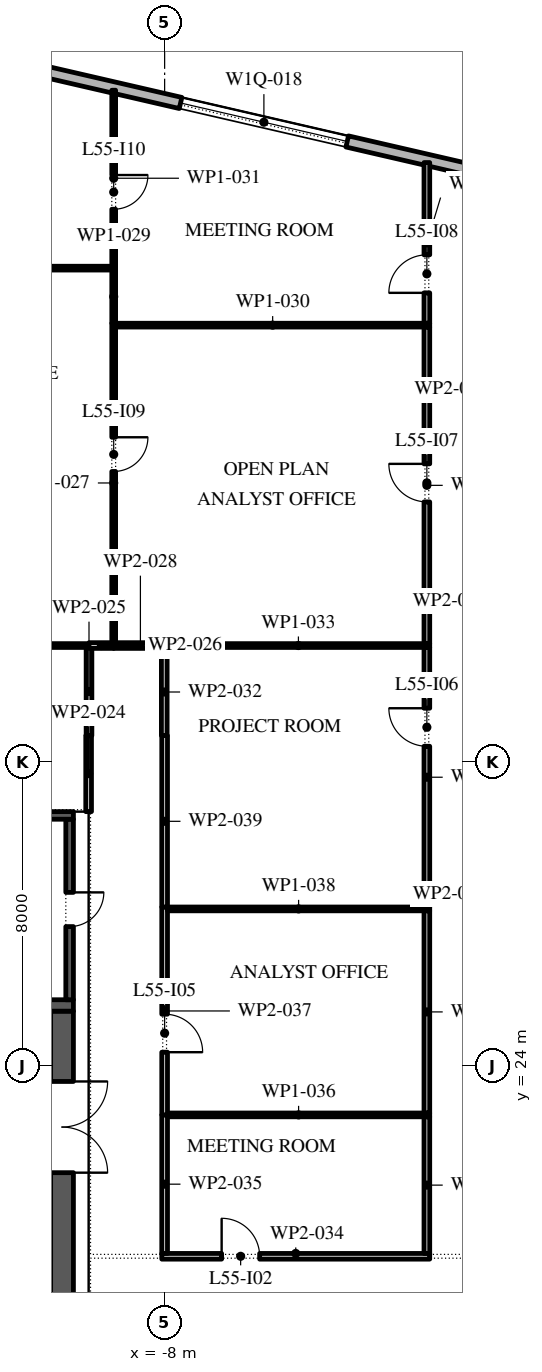
"""IFC4 building model, lengths in metres.
Left out: names, types, materials, properties, quantities, classifications, styles, units other than length and angle.
Written with IfcOpenShell. Run it as: python <this file> out.ifc"""

import sys

from ifc_helpers import new_model, si_unit, direction, frame, frame_2d, origin, place, context, subcontext, project, spatial, rectangle, extrude, element, fill, save


model = new_model("IFC4")
c1 = context("Model", 3, precision=1e-05, world=origin(), true_north=direction((0.0, 1.0)))
c2 = subcontext(c1, "Body", "Model", "MODEL_VIEW")
j1 = project(units=[si_unit("LENGTHUNIT", "METRE"), si_unit("PLANEANGLEUNIT", "RADIAN")], contexts=[c1])
p1 = place(None, origin())
s1 = spatial("IfcSite", under=j1, at=p1, CompositionType="ELEMENT")
p2 = place(p1, origin())
s2 = spatial("IfcBuilding", under=s1, at=p2, CompositionType="ELEMENT")
p3 = place(p2, frame((0.0, 0.0, 255.6)))
s3 = spatial("IfcBuildingStorey", under=s2, at=p3, CompositionType="ELEMENT", Elevation=255.6)
p4 = place(p3, frame((29.616, 40.758, 0.0), z_axis=(0.0, 0.0, 1.0), x_axis=(-0.974370532314, 0.224949029246, 0.0)))
e1 = element("IfcWall", 1, at=p4, inside=s3, PredefinedType="STANDARD", context=c2, shape_type="SweptSolid", body=[
    extrude(rectangle(XDim=48.0, YDim=0.3, at=frame_2d((24.0, 0.0))), origin(), (0.0, 0.0, 1.0), 4.0),
])
p5 = place(p4, frame((1.625, 0.0, 0.45)))
e2 = element("IfcOpeningElement", 2, at=p5, cuts=e1, PredefinedType="OPENING", context=c2, shape_type="SweptSolid", body=[
    extrude(rectangle(XDim=4.5, YDim=2.675, at=frame_2d((2.25, 1.337))), frame((0.0, 0.16, 0.0), z_axis=(0.0, -1.0, 0.0), x_axis=(1.0, 0.0, 0.0)), (0.0, 0.0, 1.0), 0.32),
])
p6 = place(p4, frame((10.575, 0.0, 0.0)))
e3 = element("IfcOpeningElement", 3, at=p6, cuts=e1, PredefinedType="OPENING", context=c2, shape_type="SweptSolid", body=[
    extrude(rectangle(XDim=2.4, YDim=3.5, at=frame_2d((1.2, 1.75))), frame((0.0, 0.16, 0.0), z_axis=(0.0, -1.0, 0.0), x_axis=(1.0, 0.0, 0.0)), (0.0, 0.0, 1.0), 0.32),
])
p7 = place(p4, frame((17.575, 0.0, 0.45)))
e4 = element("IfcOpeningElement", 4, at=p7, cuts=e1, PredefinedType="OPENING", context=c2, shape_type="SweptSolid", body=[
    extrude(rectangle(XDim=4.5, YDim=2.525, at=frame_2d((2.25, 1.262))), frame((0.0, 0.16, 0.0), z_axis=(0.0, -1.0, 0.0), x_axis=(1.0, 0.0, 0.0)), (0.0, 0.0, 1.0), 0.32),
])
p8 = place(p4, frame((25.625, 0.0, 0.45)))
e5 = element("IfcOpeningElement", 5, at=p8, cuts=e1, PredefinedType="OPENING", context=c2, shape_type="SweptSolid", body=[
    extrude(rectangle(XDim=4.5, YDim=2.45, at=frame_2d((2.25, 1.225))), frame((0.0, 0.16, 0.0), z_axis=(0.0, -1.0, 0.0), x_axis=(1.0, 0.0, 0.0)), (0.0, 0.0, 1.0), 0.32),
])
p9 = place(p4, frame((33.675, 0.0, 0.45)))
e6 = element("IfcOpeningElement", 6, at=p9, cuts=e1, PredefinedType="OPENING", context=c2, shape_type="SweptSolid", body=[
    extrude(rectangle(XDim=4.5, YDim=2.45, at=frame_2d((2.25, 1.225))), frame((0.0, 0.16, 0.0), z_axis=(0.0, -1.0, 0.0), x_axis=(1.0, 0.0, 0.0)), (0.0, 0.0, 1.0), 0.32),
])
p10 = place(p4, frame((42.775, 0.0, 0.0)))
e7 = element("IfcOpeningElement", 7, at=p10, cuts=e1, PredefinedType="OPENING", context=c2, shape_type="SweptSolid", body=[
    extrude(rectangle(XDim=2.4, YDim=3.5, at=frame_2d((1.2, 1.75))), frame((0.0, 0.16, 0.0), z_axis=(0.0, -1.0, 0.0), x_axis=(1.0, 0.0, 0.0)), (0.0, 0.0, 1.0), 0.32),
])
p11 = place(p3, frame((-10.7, -2.45, 0.0), z_axis=(0.0, 0.0, 1.0), x_axis=(0.0, 1.0, 0.0)))
e8 = element("IfcWall", 8, at=p11, inside=s3, PredefinedType="SHEAR", context=c2, shape_type="SweptSolid", body=[
    extrude(rectangle(XDim=27.9, YDim=0.6, at=frame_2d((13.95, 0.0))), origin(), (0.0, 0.0, 1.0), 4.0),
])
p12 = place(p11, frame((23.65, 0.0, 0.0)))
e9 = element("IfcOpeningElement", 9, at=p12, cuts=e8, PredefinedType="OPENING", context=c2, shape_type="SweptSolid", body=[
    extrude(rectangle(XDim=2.4, YDim=2.1, at=frame_2d((1.2, 1.05))), frame((0.0, 0.31, 0.0), z_axis=(0.0, -1.0, 0.0), x_axis=(1.0, 0.0, 0.0)), (0.0, 0.0, 1.0), 0.62),
])
p13 = place(p11, frame((1.087, 0.0, 0.0)))
e10 = element("IfcOpeningElement", 10, at=p13, cuts=e8, PredefinedType="OPENING", context=c2, shape_type="SweptSolid", body=[
    extrude(rectangle(XDim=0.9, YDim=2.1, at=frame_2d((0.45, 1.05))), frame((0.0, 0.31, 0.0), z_axis=(0.0, -1.0, 0.0), x_axis=(1.0, 0.0, 0.0)), (0.0, 0.0, 1.0), 0.62),
])
p14 = place(p11, frame((4.262, 0.0, 0.0)))
e11 = element("IfcOpeningElement", 11, at=p14, cuts=e8, PredefinedType="OPENING", context=c2, shape_type="SweptSolid", body=[
    extrude(rectangle(XDim=1.0, YDim=2.1, at=frame_2d((0.5, 1.05))), frame((0.0, 0.31, 0.0), z_axis=(0.0, -1.0, 0.0), x_axis=(1.0, 0.0, 0.0)), (0.0, 0.0, 1.0), 0.62),
])
p15 = place(p3, frame((-21.6, 25.6, 0.0), z_axis=(0.0, 0.0, 1.0), x_axis=(1.0, 0.0, 0.0)))
e12 = element("IfcWall", 12, at=p15, inside=s3, PredefinedType="SHEAR", context=c2, shape_type="SweptSolid", body=[
    extrude(rectangle(XDim=11.2, YDim=0.3, at=frame_2d((5.6, 0.0))), origin(), (0.0, 0.0, 1.0), 4.0),
])
p16 = place(p3, frame((-10.5, 25.75, 0.0), z_axis=(0.0, 0.0, 1.0), x_axis=(0.0, 1.0, 0.0)))
e13 = element("IfcWall", 13, at=p16, inside=s3, PredefinedType="SHEAR", context=c2, shape_type="SweptSolid", body=[
    extrude(rectangle(XDim=4.75, YDim=0.2, at=frame_2d((2.375, 0.0))), origin(), (0.0, 0.0, 1.0), 4.0),
])
p17 = place(p16, frame((1.925, 0.0, 0.0)))
e14 = element("IfcOpeningElement", 14, at=p17, cuts=e13, PredefinedType="OPENING", context=c2, shape_type="SweptSolid", body=[
    extrude(rectangle(XDim=0.9, YDim=2.1, at=frame_2d((0.45, 1.05))), frame((0.0, 0.11, 0.0), z_axis=(0.0, -1.0, 0.0), x_axis=(1.0, 0.0, 0.0)), (0.0, 0.0, 1.0), 0.22),
])
p18 = place(p3, frame((-21.6, 30.6, 0.0), z_axis=(0.0, 0.0, 1.0), x_axis=(1.0, 0.0, 0.0)))
e15 = element("IfcWall", 15, at=p18, inside=s3, PredefinedType="SHEAR", context=c2, shape_type="SweptSolid", body=[
    extrude(rectangle(XDim=11.2, YDim=0.2, at=frame_2d((5.6, 0.0))), origin(), (0.0, 0.0, 1.0), 4.0),
])
p19 = place(p3, frame((-17.19, 35.07, 0.0), z_axis=(0.0, 0.0, 1.0), x_axis=(1.0, 0.0, 0.0)))
e16 = element("IfcWall", 16, at=p19, inside=s3, PredefinedType="PARTITIONING", context=c2, shape_type="SweptSolid", body=[
    extrude(rectangle(XDim=7.2, YDim=0.1, at=frame_2d((3.6, 0.0))), origin(), (0.0, 0.0, 1.0), 4.0),
])
p20 = place(p3, frame((-17.14, 45.0, 0.0), z_axis=(0.0, 0.0, 1.0), x_axis=(1.0, 0.0, 0.0)))
e17 = element("IfcWall", 17, at=p20, inside=s3, PredefinedType="PARTITIONING", context=c2, shape_type="SweptSolid", body=[
    extrude(rectangle(XDim=7.85, YDim=0.1, at=frame_2d((3.925, 0.0))), origin(), (0.0, 0.0, 1.0), 4.0),
])
p21 = place(p3, frame((-10.0, 30.7, 0.0), z_axis=(0.0, 0.0, 1.0), x_axis=(0.0, 1.0, 0.0)))
e18 = element("IfcWall", 18, at=p21, inside=s3, PredefinedType="PARTITIONING", context=c2, shape_type="SweptSolid", body=[
    extrude(rectangle(XDim=2.0, YDim=0.15, at=frame_2d((1.0, 0.0))), origin(), (0.0, 0.0, 1.0), 4.0),
])
p22 = place(p3, frame((-9.99, 32.7, 0.0), z_axis=(0.0, 0.0, 1.0), x_axis=(0.0, 1.0, 0.0)))
e19 = element("IfcWall", 19, at=p22, inside=s3, PredefinedType="PARTITIONING", context=c2, shape_type="SweptSolid", body=[
    extrude(rectangle(XDim=2.32, YDim=0.15, at=frame_2d((1.16, 0.0))), origin(), (0.0, 0.0, 1.0), 4.0),
])
p23 = place(p3, frame((-9.99, 35.07, 0.0), z_axis=(0.0, 0.0, 1.0), x_axis=(1.0, 0.0, 0.0)))
e20 = element("IfcWall", 20, at=p23, inside=s3, PredefinedType="PARTITIONING", context=c2, shape_type="SweptSolid", body=[
    extrude(rectangle(XDim=0.65, YDim=0.15, at=frame_2d((0.325, 0.0))), origin(), (0.0, 0.0, 1.0), 4.0),
])
p24 = place(p3, frame((-9.34, 35.145, 0.0), z_axis=(0.0, 0.0, 1.0), x_axis=(0.0, 1.0, 0.0)))
e21 = element("IfcWall", 21, at=p24, inside=s3, PredefinedType="PARTITIONING", context=c2, shape_type="SweptSolid", body=[
    extrude(rectangle(XDim=8.405, YDim=0.1, at=frame_2d((4.203, 0.0))), origin(), (0.0, 0.0, 1.0), 4.0),
])
p25 = place(p24, frame((4.505, 0.0, 0.0)))
e22 = element("IfcOpeningElement", 22, at=p25, cuts=e21, PredefinedType="OPENING", context=c2, shape_type="SweptSolid", body=[
    extrude(rectangle(XDim=0.9, YDim=2.1, at=frame_2d((0.45, 1.05))), frame((0.0, 0.06, 0.0), z_axis=(0.0, -1.0, 0.0), x_axis=(1.0, 0.0, 0.0)), (0.0, 0.0, 1.0), 0.12),
])
p26 = place(p3, frame((-9.34, 35.07, 0.0), z_axis=(0.0, 0.0, 1.0), x_axis=(1.0, 0.0, 0.0)))
e23 = element("IfcWall", 23, at=p26, inside=s3, PredefinedType="PARTITIONING", context=c2, shape_type="SweptSolid", body=[
    extrude(rectangle(XDim=1.405, YDim=0.15, at=frame_2d((0.703, 0.0))), origin(), (0.0, 0.0, 1.0), 4.0),
])
p27 = place(p3, frame((-9.34, 43.55, 0.0), z_axis=(0.0, 0.0, 1.0), x_axis=(0.0, 1.0, 0.0)))
e24 = element("IfcWall", 24, at=p27, inside=s3, PredefinedType="PARTITIONING", context=c2, shape_type="SweptSolid", body=[
    extrude(rectangle(XDim=1.4, YDim=0.1, at=frame_2d((0.7, 0.0))), origin(), (0.0, 0.0, 1.0), 4.0),
])
p28 = place(p3, frame((-9.29, 43.5, 0.0), z_axis=(0.0, 0.0, 1.0), x_axis=(1.0, 0.0, 0.0)))
e25 = element("IfcWall", 25, at=p28, inside=s3, PredefinedType="PARTITIONING", context=c2, shape_type="SweptSolid", body=[
    extrude(rectangle(XDim=8.265, YDim=0.1, at=frame_2d((4.133, 0.0))), origin(), (0.0, 0.0, 1.0), 4.0),
])
p29 = place(p3, frame((-9.34, 45.05, 0.0), z_axis=(0.0, 0.0, 1.0), x_axis=(0.0, 1.0, 0.0)))
e26 = element("IfcWall", 26, at=p29, inside=s3, PredefinedType="PARTITIONING", context=c2, shape_type="SweptSolid", body=[
    extrude(rectangle(XDim=4.631, YDim=0.1, at=frame_2d((2.315, 0.0))), origin(), (0.0, 0.0, 1.0), 4.0),
])
p30 = place(p29, frame((1.5, 0.0, 0.0)))
e27 = element("IfcOpeningElement", 27, at=p30, cuts=e26, PredefinedType="OPENING", context=c2, shape_type="SweptSolid", body=[
    extrude(rectangle(XDim=0.9, YDim=2.1, at=frame_2d((0.45, 1.05))), frame((0.0, 0.06, 0.0), z_axis=(0.0, -1.0, 0.0), x_axis=(1.0, 0.0, 0.0)), (0.0, 0.0, 1.0), 0.12),
])
p31 = place(p3, frame((-8.01, 34.995, 0.0), z_axis=(0.0, 0.0, 1.0), x_axis=(0.0, -1.0, 0.0)))
e28 = element("IfcWall", 28, at=p31, inside=s3, PredefinedType="PARTITIONING", context=c2, shape_type="SweptSolid", body=[
    extrude(rectangle(XDim=2.295, YDim=0.15, at=frame_2d((1.147, 0.0))), origin(), (0.0, 0.0, 1.0), 4.0),
])
p32 = place(p3, frame((-7.935, 35.07, 0.0), z_axis=(0.0, 0.0, 1.0), x_axis=(1.0, 0.0, 0.0)))
e29 = element("IfcWall", 29, at=p32, inside=s3, PredefinedType="PARTITIONING", context=c2, shape_type="SweptSolid", body=[
    extrude(rectangle(XDim=6.91, YDim=0.1, at=frame_2d((3.455, 0.0))), origin(), (0.0, 0.0, 1.0), 4.0),
])
p33 = place(p3, frame((-8.075, 19.0, 0.0), z_axis=(0.0, 0.0, 1.0), x_axis=(1.0, 0.0, 0.0)))
e30 = element("IfcWall", 30, at=p33, inside=s3, PredefinedType="PARTITIONING", context=c2, shape_type="SweptSolid", body=[
    extrude(rectangle(XDim=7.05, YDim=0.15, at=frame_2d((3.525, 0.0))), origin(), (0.0, 0.0, 1.0), 4.0),
])
p34 = place(p33, frame((1.575, 0.0, 0.0)))
e31 = element("IfcOpeningElement", 31, at=p34, cuts=e30, PredefinedType="OPENING", context=c2, shape_type="SweptSolid", body=[
    extrude(rectangle(XDim=1.0, YDim=2.1, at=frame_2d((0.5, 1.05))), frame((0.0, 0.085, 0.0), z_axis=(0.0, -1.0, 0.0), x_axis=(1.0, 0.0, 0.0)), (0.0, 0.0, 1.0), 0.17),
])
p35 = place(p3, frame((-8.0, 22.72, 0.0), z_axis=(0.0, 0.0, 1.0), x_axis=(0.0, -1.0, 0.0)))
e32 = element("IfcWall", 32, at=p35, inside=s3, PredefinedType="PARTITIONING", context=c2, shape_type="SweptSolid", body=[
    extrude(rectangle(XDim=3.645, YDim=0.15, at=frame_2d((1.823, 0.0))), origin(), (0.0, 0.0, 1.0), 4.0),
])
p36 = place(p3, frame((-7.925, 22.72, 0.0), z_axis=(0.0, 0.0, 1.0), x_axis=(1.0, 0.0, 0.0)))
e33 = element("IfcWall", 33, at=p36, inside=s3, PredefinedType="PARTITIONING", context=c2, shape_type="SweptSolid", body=[
    extrude(rectangle(XDim=6.9, YDim=0.1, at=frame_2d((3.45, 0.0))), origin(), (0.0, 0.0, 1.0), 4.0),
])
p37 = place(p3, frame((-8.0, 28.19, 0.0), z_axis=(0.0, 0.0, 1.0), x_axis=(0.0, -1.0, 0.0)))
e34 = element("IfcWall", 34, at=p37, inside=s3, PredefinedType="PARTITIONING", context=c2, shape_type="SweptSolid", body=[
    extrude(rectangle(XDim=5.47, YDim=0.15, at=frame_2d((2.735, 0.0))), origin(), (0.0, 0.0, 1.0), 4.0),
])
p38 = place(p37, frame((2.82, 0.0, 0.0)))
e35 = element("IfcOpeningElement", 35, at=p38, cuts=e34, PredefinedType="OPENING", context=c2, shape_type="SweptSolid", body=[
    extrude(rectangle(XDim=1.0, YDim=2.1, at=frame_2d((0.5, 1.05))), frame((0.0, 0.085, 0.0), z_axis=(0.0, -1.0, 0.0), x_axis=(1.0, 0.0, 0.0)), (0.0, 0.0, 1.0), 0.17),
])
p39 = place(p3, frame((-7.925, 28.14, 0.0), z_axis=(0.0, 0.0, 1.0), x_axis=(1.0, 0.0, 0.0)))
e36 = element("IfcWall", 36, at=p39, inside=s3, PredefinedType="PARTITIONING", context=c2, shape_type="SweptSolid", body=[
    extrude(rectangle(XDim=6.9, YDim=0.1, at=frame_2d((3.45, 0.0))), origin(), (0.0, 0.0, 1.0), 4.0),
])
p40 = place(p3, frame((-8.0, 32.7, 0.0), z_axis=(0.0, 0.0, 1.0), x_axis=(0.0, -1.0, 0.0)))
e37 = element("IfcWall", 37, at=p40, inside=s3, PredefinedType="PARTITIONING", context=c2, shape_type="SweptSolid", body=[
    extrude(rectangle(XDim=4.51, YDim=0.15, at=frame_2d((2.255, 0.0))), origin(), (0.0, 0.0, 1.0), 4.0),
])
p41 = place(p3, frame((-1.1, 19.075, 0.0), z_axis=(0.0, 0.0, 1.0), x_axis=(0.0, 1.0, 0.0)))
e38 = element("IfcWall", 38, at=p41, inside=s3, PredefinedType="PARTITIONING", context=c2, shape_type="SweptSolid", body=[
    extrude(rectangle(XDim=3.595, YDim=0.15, at=frame_2d((1.797, 0.0))), origin(), (0.0, 0.0, 1.0), 4.0),
])
p42 = place(p3, frame((-1.1, 22.77, 0.0), z_axis=(0.0, 0.0, 1.0), x_axis=(0.0, 1.0, 0.0)))
e39 = element("IfcWall", 39, at=p42, inside=s3, PredefinedType="PARTITIONING", context=c2, shape_type="SweptSolid", body=[
    extrude(rectangle(XDim=5.32, YDim=0.15, at=frame_2d((2.66, 0.0))), origin(), (0.0, 0.0, 1.0), 4.0),
])
p43 = place(p3, frame((-1.1, 28.19, 0.0), z_axis=(0.0, 0.0, 1.0), x_axis=(0.0, 1.0, 0.0)))
e40 = element("IfcWall", 40, at=p43, inside=s3, PredefinedType="PARTITIONING", context=c2, shape_type="SweptSolid", body=[
    extrude(rectangle(XDim=6.83, YDim=0.15, at=frame_2d((3.415, 0.0))), origin(), (0.0, 0.0, 1.0), 4.0),
])
p44 = place(p43, frame((4.23, 0.0, 0.0)))
e41 = element("IfcOpeningElement", 41, at=p44, cuts=e40, PredefinedType="OPENING", context=c2, shape_type="SweptSolid", body=[
    extrude(rectangle(XDim=1.0, YDim=2.1, at=frame_2d((0.5, 1.05))), frame((0.0, 0.085, 0.0), z_axis=(0.0, -1.0, 0.0), x_axis=(1.0, 0.0, 0.0)), (0.0, 0.0, 1.0), 0.17),
])
p45 = place(p3, frame((-1.1, 35.12, 0.0), z_axis=(0.0, 0.0, 1.0), x_axis=(0.0, 1.0, 0.0)))
e42 = element("IfcWall", 42, at=p45, inside=s3, PredefinedType="PARTITIONING", context=c2, shape_type="SweptSolid", body=[
    extrude(rectangle(XDim=8.33, YDim=0.15, at=frame_2d((4.165, 0.0))), origin(), (0.0, 0.0, 1.0), 4.0),
])
p46 = place(p45, frame((3.73, 0.0, 0.0)))
e43 = element("IfcOpeningElement", 43, at=p46, cuts=e42, PredefinedType="OPENING", context=c2, shape_type="SweptSolid", body=[
    extrude(rectangle(XDim=1.0, YDim=2.1, at=frame_2d((0.5, 1.05))), frame((0.0, 0.085, 0.0), z_axis=(0.0, -1.0, 0.0), x_axis=(1.0, 0.0, 0.0)), (0.0, 0.0, 1.0), 0.17),
])
p47 = place(p3, frame((-1.1, 43.55, 0.0), z_axis=(0.0, 0.0, 1.0), x_axis=(0.0, 1.0, 0.0)))
e44 = element("IfcWall", 44, at=p47, inside=s3, PredefinedType="PARTITIONING", context=c2, shape_type="SweptSolid", body=[
    extrude(rectangle(XDim=4.228, YDim=0.15, at=frame_2d((2.114, 0.0))), origin(), (0.0, 0.0, 1.0), 4.0),
])
p48 = place(p47, frame((0.8, 0.0, 0.0)))
e45 = element("IfcOpeningElement", 45, at=p48, cuts=e44, PredefinedType="OPENING", context=c2, shape_type="SweptSolid", body=[
    extrude(rectangle(XDim=1.0, YDim=2.1, at=frame_2d((0.5, 1.05))), frame((0.0, 0.085, 0.0), z_axis=(0.0, -1.0, 0.0), x_axis=(1.0, 0.0, 0.0)), (0.0, 0.0, 1.0), 0.17),
])
p49 = place(p9, origin())
e46 = element("IfcWindow", 46, at=p49, inside=s3, PartitioningType="DOUBLE_PANEL_VERTICAL", PredefinedType="WINDOW", context=c2, shape_type="SweptSolid", body=[
    extrude(rectangle(XDim=4.5, YDim=2.45, at=frame_2d((2.25, 1.225))), frame((0.0, 0.03, 0.0), z_axis=(0.0, -1.0, 0.0), x_axis=(1.0, 0.0, 0.0)), (0.0, 0.0, 1.0), 0.06),
])
fill(e6, e46)
p50 = place(p12, frame((2.4, 0.0, 0.0), z_axis=(0.0, 0.0, 1.0), x_axis=(-1.0, 0.0, 0.0)))
e47 = element("IfcDoor", 47, at=p50, inside=s3, OperationType="DOUBLE_DOOR_SINGLE_SWING", PredefinedType="DOOR", context=c2, shape_type="SweptSolid", body=[
    extrude(rectangle(XDim=2.4, YDim=2.1, at=frame_2d((1.2, 1.05))), frame((0.0, 0.025, 0.0), z_axis=(0.0, -1.0, 0.0), x_axis=(1.0, 0.0, 0.0)), (0.0, 0.0, 1.0), 0.05),
])
fill(e9, e47)
p51 = place(p17, frame((0.9, 0.15, 0.0), z_axis=(0.0, 0.0, 1.0), x_axis=(-1.0, 0.0, 0.0)))
e48 = element("IfcDoor", 48, at=p51, inside=s3, OperationType="SINGLE_SWING_RIGHT", PredefinedType="DOOR", context=c2, shape_type="SweptSolid", body=[
    extrude(rectangle(XDim=0.9, YDim=2.1, at=frame_2d((0.45, 1.05))), frame((0.0, 0.1, 0.0), z_axis=(0.0, -1.0, 0.0), x_axis=(1.0, 0.0, 0.0)), (0.0, 0.0, 1.0), 0.05),
])
fill(e14, e48)
p52 = place(p34, origin())
e49 = element("IfcDoor", 49, at=p52, inside=s3, OperationType="SINGLE_SWING_RIGHT", PredefinedType="DOOR", context=c2, shape_type="SweptSolid", body=[
    extrude(rectangle(XDim=1.0, YDim=2.1, at=frame_2d((0.5, 1.05))), frame((0.0, 0.025, 0.0), z_axis=(0.0, -1.0, 0.0), x_axis=(1.0, 0.0, 0.0)), (0.0, 0.0, 1.0), 0.05),
])
fill(e31, e49)
p53 = place(p38, origin())
e50 = element("IfcDoor", 50, at=p53, inside=s3, OperationType="SINGLE_SWING_LEFT", PredefinedType="DOOR", context=c2, shape_type="SweptSolid", body=[
    extrude(rectangle(XDim=1.0, YDim=2.1, at=frame_2d((0.5, 1.05))), frame((0.0, 0.025, 0.0), z_axis=(0.0, -1.0, 0.0), x_axis=(1.0, 0.0, 0.0)), (0.0, 0.0, 1.0), 0.05),
])
fill(e35, e50)
p54 = place(p44, origin())
e51 = element("IfcDoor", 51, at=p54, inside=s3, OperationType="SINGLE_SWING_LEFT", PredefinedType="DOOR", context=c2, shape_type="SweptSolid", body=[
    extrude(rectangle(XDim=1.0, YDim=2.1, at=frame_2d((0.5, 1.05))), frame((0.0, 0.025, 0.0), z_axis=(0.0, -1.0, 0.0), x_axis=(1.0, 0.0, 0.0)), (0.0, 0.0, 1.0), 0.05),
])
fill(e41, e51)
p55 = place(p46, origin())
e52 = element("IfcDoor", 52, at=p55, inside=s3, OperationType="SINGLE_SWING_LEFT", PredefinedType="DOOR", context=c2, shape_type="SweptSolid", body=[
    extrude(rectangle(XDim=1.0, YDim=2.1, at=frame_2d((0.5, 1.05))), frame((0.0, 0.025, 0.0), z_axis=(0.0, -1.0, 0.0), x_axis=(1.0, 0.0, 0.0)), (0.0, 0.0, 1.0), 0.05),
])
fill(e43, e52)
p56 = place(p48, origin())
e53 = element("IfcDoor", 53, at=p56, inside=s3, OperationType="SINGLE_SWING_RIGHT", PredefinedType="DOOR", context=c2, shape_type="SweptSolid", body=[
    extrude(rectangle(XDim=1.0, YDim=2.1, at=frame_2d((0.5, 1.05))), frame((0.0, 0.025, 0.0), z_axis=(0.0, -1.0, 0.0), x_axis=(1.0, 0.0, 0.0)), (0.0, 0.0, 1.0), 0.05),
])
fill(e45, e53)
p57 = place(p25, frame((0.9, 0.0, 0.0), z_axis=(0.0, 0.0, 1.0), x_axis=(-1.0, 0.0, 0.0)))
e54 = element("IfcDoor", 54, at=p57, inside=s3, OperationType="SINGLE_SWING_RIGHT", PredefinedType="DOOR", context=c2, shape_type="SweptSolid", body=[
    extrude(rectangle(XDim=0.9, YDim=2.1, at=frame_2d((0.45, 1.05))), frame((0.0, 0.025, 0.0), z_axis=(0.0, -1.0, 0.0), x_axis=(1.0, 0.0, 0.0)), (0.0, 0.0, 1.0), 0.05),
])
fill(e22, e54)
p58 = place(p30, frame((0.9, 0.0, 0.0), z_axis=(0.0, 0.0, 1.0), x_axis=(-1.0, 0.0, 0.0)))
e55 = element("IfcDoor", 55, at=p58, inside=s3, OperationType="SINGLE_SWING_RIGHT", PredefinedType="DOOR", context=c2, shape_type="SweptSolid", body=[
    extrude(rectangle(XDim=0.9, YDim=2.1, at=frame_2d((0.45, 1.05))), frame((0.0, 0.025, 0.0), z_axis=(0.0, -1.0, 0.0), x_axis=(1.0, 0.0, 0.0)), (0.0, 0.0, 1.0), 0.05),
])
fill(e27, e55)
save(model, sys.argv[1])
